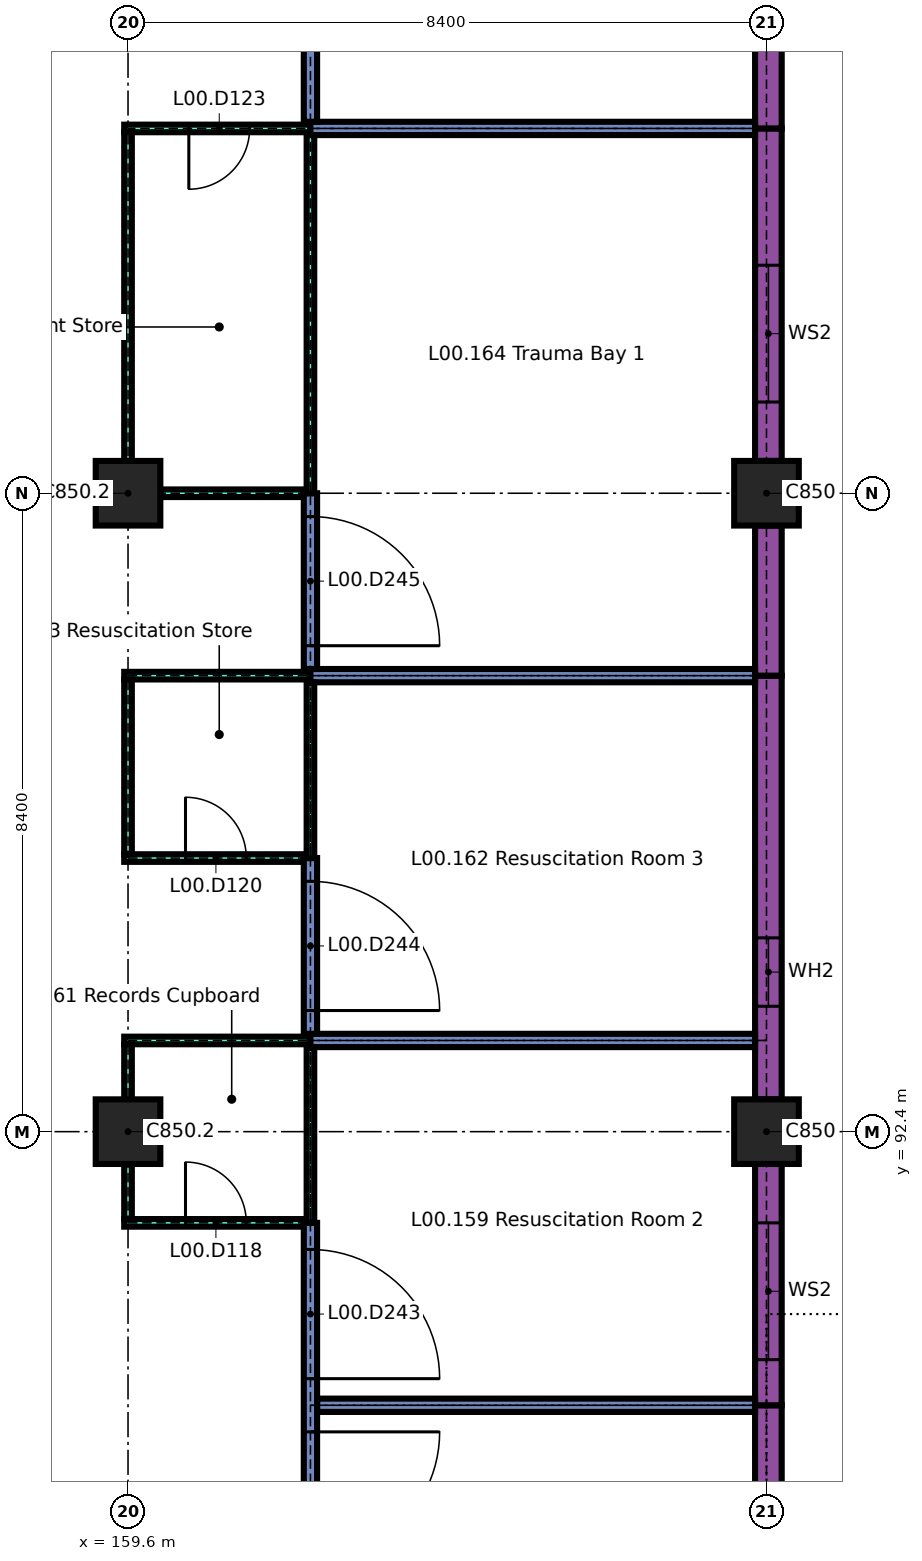
"""IFC4 building model, lengths in metres.
Left out: names, types, materials, properties, quantities, classifications, styles, units other than length and angle.
Written with IfcOpenShell. Run it as: python <this file> out.ifc"""

import sys

from ifc_helpers import new_model, si_unit, direction, frame, frame_2d, origin, origin_2d, place, context, subcontext, project, spatial, rectangle, extrude, element, fill, save


model = new_model("IFC4")
c1 = context("Model", 3, precision=1e-05, world=origin(), true_north=direction((0.0, 1.0)))
c2 = subcontext(c1, "Body", "Model", "MODEL_VIEW")
j1 = project(units=[si_unit("LENGTHUNIT", "METRE"), si_unit("PLANEANGLEUNIT", "RADIAN")], contexts=[c1])
p1 = place(None, origin())
s1 = spatial("IfcSite", under=j1, at=p1, CompositionType="ELEMENT")
p2 = place(p1, origin())
s2 = spatial("IfcBuilding", under=s1, at=p2, CompositionType="ELEMENT")
p3 = place(p2, origin())
s3 = spatial("IfcBuildingStorey", under=s2, at=p3, CompositionType="ELEMENT", Elevation=0.0)
for number, where, z_axis, x_axis in (
    (1, (159.6, 92.4, 0.0), (0.0, 0.0, 1.0), (1.0, 0.0, 0.0)),
    (2, (168.0, 92.4, 0.0), (0.0, 0.0, 1.0), (1.0, 0.0, 0.0)),
    (3, (159.6, 100.8, 0.0), (0.0, 0.0, 1.0), (1.0, 0.0, 0.0)),
    (4, (168.0, 100.8, 0.0), (0.0, 0.0, 1.0), (1.0, 0.0, 0.0)),
):
    element("IfcColumn", number, at=place(p3, frame(where, z_axis=z_axis, x_axis=x_axis)), inside=s3, PredefinedType="COLUMN", context=c2, shape_type="SweptSolid", body=[
        extrude(rectangle(XDim=0.85, YDim=0.85, at=origin_2d()), origin(), (0.0, 0.0, 1.0), 4.14),
    ])
p4 = place(p3, frame((168.025, 84.0, 0.0), z_axis=(0.0, 0.0, 1.0), x_axis=(0.0, 1.0, 0.0)))
e5 = element("IfcWall", 5, at=p4, inside=s3, PredefinedType="SOLIDWALL", context=c2, shape_type="SweptSolid", body=[
    extrude(rectangle(XDim=4.8, YDim=0.35, at=frame_2d((2.4, 0.0))), origin(), (0.0, 0.0, 1.0), 3.84),
])
p5 = place(p4, frame((1.2, 0.0, 0.9)))
e6 = element("IfcOpeningElement", 6, at=p5, cuts=e5, PredefinedType="OPENING", context=c2, shape_type="SweptSolid", body=[
    extrude(rectangle(XDim=1.8, YDim=2.1, at=frame_2d((0.9, 1.05))), frame((0.0, 0.185, 0.0), z_axis=(0.0, -1.0, 0.0), x_axis=(1.0, 0.0, 0.0)), (0.0, 0.0, 1.0), 0.37),
])
p6 = place(p3, frame((168.025, 88.8, 0.0), z_axis=(0.0, 0.0, 1.0), x_axis=(0.0, 1.0, 0.0)))
e7 = element("IfcWall", 7, at=p6, inside=s3, PredefinedType="SOLIDWALL", context=c2, shape_type="SweptSolid", body=[
    extrude(rectangle(XDim=3.175, YDim=0.35, at=frame_2d((1.587, 0.0))), origin(), (0.0, 0.0, 1.0), 3.84),
])
p7 = place(p6, frame((0.6, 0.0, 0.9)))
e8 = element("IfcOpeningElement", 8, at=p7, cuts=e7, PredefinedType="OPENING", context=c2, shape_type="SweptSolid", body=[
    extrude(rectangle(XDim=1.8, YDim=2.1, at=frame_2d((0.9, 1.05))), frame((0.0, 0.185, 0.0), z_axis=(0.0, -1.0, 0.0), x_axis=(1.0, 0.0, 0.0)), (0.0, 0.0, 1.0), 0.37),
])
p8 = place(p3, frame((168.025, 92.825, 0.0), z_axis=(0.0, 0.0, 1.0), x_axis=(0.0, 1.0, 0.0)))
e9 = element("IfcWall", 9, at=p8, inside=s3, PredefinedType="SOLIDWALL", context=c2, shape_type="SweptSolid", body=[
    extrude(rectangle(XDim=5.575, YDim=0.35, at=frame_2d((2.788, 0.0))), origin(), (0.0, 0.0, 1.0), 3.84),
])
p9 = place(p8, frame((1.225, 0.0, 0.9)))
e10 = element("IfcOpeningElement", 10, at=p9, cuts=e9, PredefinedType="OPENING", context=c2, shape_type="SweptSolid", body=[
    extrude(rectangle(XDim=0.9, YDim=2.1, at=frame_2d((0.45, 1.05))), frame((0.0, 0.185, 0.0), z_axis=(0.0, -1.0, 0.0), x_axis=(1.0, 0.0, 0.0)), (0.0, 0.0, 1.0), 0.37),
])
p10 = place(p3, frame((168.025, 98.4, 0.0), z_axis=(0.0, 0.0, 1.0), x_axis=(0.0, 1.0, 0.0)))
e11 = element("IfcWall", 11, at=p10, inside=s3, PredefinedType="SOLIDWALL", context=c2, shape_type="SweptSolid", body=[
    extrude(rectangle(XDim=1.975, YDim=0.35, at=frame_2d((0.988, 0.0))), origin(), (0.0, 0.0, 1.0), 3.84),
])
p11 = place(p3, frame((168.025, 101.225, 0.0), z_axis=(0.0, 0.0, 1.0), x_axis=(0.0, 1.0, 0.0)))
e12 = element("IfcWall", 12, at=p11, inside=s3, PredefinedType="SOLIDWALL", context=c2, shape_type="SweptSolid", body=[
    extrude(rectangle(XDim=4.375, YDim=0.35, at=frame_2d((2.188, 0.0))), origin(), (0.0, 0.0, 1.0), 3.84),
])
p12 = place(p11, frame((0.775, 0.0, 0.9)))
e13 = element("IfcOpeningElement", 13, at=p12, cuts=e12, PredefinedType="OPENING", context=c2, shape_type="SweptSolid", body=[
    extrude(rectangle(XDim=1.8, YDim=2.1, at=frame_2d((0.9, 1.05))), frame((0.0, 0.185, 0.0), z_axis=(0.0, -1.0, 0.0), x_axis=(1.0, 0.0, 0.0)), (0.0, 0.0, 1.0), 0.37),
])
p13 = place(p3, frame((168.025, 105.6, 0.0), z_axis=(0.0, 0.0, 1.0), x_axis=(0.0, 1.0, 0.0)))
e14 = element("IfcWall", 14, at=p13, inside=s3, PredefinedType="SOLIDWALL", context=c2, shape_type="SweptSolid", body=[
    extrude(rectangle(XDim=3.6, YDim=0.35, at=frame_2d((1.8, 0.0))), origin(), (0.0, 0.0, 1.0), 3.84),
])
p14 = place(p3, frame((162.087, 88.8, 0.0), z_axis=(0.0, 0.0, 1.0), x_axis=(1.0, 0.0, 0.0)))
e15 = element("IfcWall", 15, at=p14, inside=s3, PredefinedType="PARTITIONING", context=c2, shape_type="SweptSolid", body=[
    extrude(rectangle(XDim=5.763, YDim=0.175, at=frame_2d((2.881, 0.0))), origin(), (0.0, 0.0, 1.0), 4.14),
])
p15 = place(p3, frame((159.55, 91.2, 0.0), z_axis=(0.0, 0.0, 1.0), x_axis=(1.0, 0.0, 0.0)))
e16 = element("IfcWall", 16, at=p15, inside=s3, PredefinedType="PARTITIONING", context=c2, shape_type="SweptSolid", body=[
    extrude(rectangle(XDim=2.363, YDim=0.1, at=frame_2d((1.181, 0.0))), origin(), (0.0, 0.0, 1.0), 4.14),
])
p16 = place(p15, frame((0.806, 0.0, 0.0)))
e17 = element("IfcOpeningElement", 17, at=p16, cuts=e16, PredefinedType="OPENING", context=c2, shape_type="SweptSolid", body=[
    extrude(rectangle(XDim=0.8, YDim=2.1, at=frame_2d((0.4, 1.05))), frame((0.0, 0.06, 0.0), z_axis=(0.0, -1.0, 0.0), x_axis=(1.0, 0.0, 0.0)), (0.0, 0.0, 1.0), 0.12),
])
p17 = place(p3, frame((159.55, 93.6, 0.0), z_axis=(0.0, 0.0, 1.0), x_axis=(1.0, 0.0, 0.0)))
e18 = element("IfcWall", 18, at=p17, inside=s3, PredefinedType="PARTITIONING", context=c2, shape_type="SweptSolid", body=[
    extrude(rectangle(XDim=2.45, YDim=0.1, at=frame_2d((1.225, 0.0))), origin(), (0.0, 0.0, 1.0), 4.14),
])
p18 = place(p3, frame((162.0, 93.6, 0.0), z_axis=(0.0, 0.0, 1.0), x_axis=(1.0, 0.0, 0.0)))
e19 = element("IfcWall", 19, at=p18, inside=s3, PredefinedType="PARTITIONING", context=c2, shape_type="SweptSolid", body=[
    extrude(rectangle(XDim=5.85, YDim=0.175, at=frame_2d((2.925, 0.0))), origin(), (0.0, 0.0, 1.0), 4.14),
])
p19 = place(p3, frame((159.55, 96.0, 0.0), z_axis=(0.0, 0.0, 1.0), x_axis=(1.0, 0.0, 0.0)))
e20 = element("IfcWall", 20, at=p19, inside=s3, PredefinedType="PARTITIONING", context=c2, shape_type="SweptSolid", body=[
    extrude(rectangle(XDim=2.363, YDim=0.1, at=frame_2d((1.181, 0.0))), origin(), (0.0, 0.0, 1.0), 4.14),
])
p20 = place(p19, frame((0.806, 0.0, 0.0)))
e21 = element("IfcOpeningElement", 21, at=p20, cuts=e20, PredefinedType="OPENING", context=c2, shape_type="SweptSolid", body=[
    extrude(rectangle(XDim=0.8, YDim=2.1, at=frame_2d((0.4, 1.05))), frame((0.0, 0.06, 0.0), z_axis=(0.0, -1.0, 0.0), x_axis=(1.0, 0.0, 0.0)), (0.0, 0.0, 1.0), 0.12),
])
p21 = place(p3, frame((159.55, 98.4, 0.0), z_axis=(0.0, 0.0, 1.0), x_axis=(1.0, 0.0, 0.0)))
e22 = element("IfcWall", 22, at=p21, inside=s3, PredefinedType="PARTITIONING", context=c2, shape_type="SweptSolid", body=[
    extrude(rectangle(XDim=2.45, YDim=0.1, at=frame_2d((1.225, 0.0))), origin(), (0.0, 0.0, 1.0), 4.14),
])
p22 = place(p3, frame((162.0, 98.4, 0.0), z_axis=(0.0, 0.0, 1.0), x_axis=(1.0, 0.0, 0.0)))
e23 = element("IfcWall", 23, at=p22, inside=s3, PredefinedType="PARTITIONING", context=c2, shape_type="SweptSolid", body=[
    extrude(rectangle(XDim=5.85, YDim=0.175, at=frame_2d((2.925, 0.0))), origin(), (0.0, 0.0, 1.0), 4.14),
])
p23 = place(p3, frame((160.025, 100.8, 0.0), z_axis=(0.0, 0.0, 1.0), x_axis=(1.0, 0.0, 0.0)))
e24 = element("IfcWall", 24, at=p23, inside=s3, PredefinedType="PARTITIONING", context=c2, shape_type="SweptSolid", body=[
    extrude(rectangle(XDim=1.888, YDim=0.1, at=frame_2d((0.944, 0.0))), origin(), (0.0, 0.0, 1.0), 4.14),
])
p24 = place(p3, frame((159.55, 105.6, 0.0), z_axis=(0.0, 0.0, 1.0), x_axis=(1.0, 0.0, 0.0)))
e25 = element("IfcWall", 25, at=p24, inside=s3, PredefinedType="PARTITIONING", context=c2, shape_type="SweptSolid", body=[
    extrude(rectangle(XDim=2.45, YDim=0.1, at=frame_2d((1.225, 0.0))), origin(), (0.0, 0.0, 1.0), 4.14),
])
p25 = place(p24, frame((0.85, 0.0, 0.0)))
e26 = element("IfcOpeningElement", 26, at=p25, cuts=e25, PredefinedType="OPENING", context=c2, shape_type="SweptSolid", body=[
    extrude(rectangle(XDim=0.8, YDim=2.1, at=frame_2d((0.4, 1.05))), frame((0.0, 0.06, 0.0), z_axis=(0.0, -1.0, 0.0), x_axis=(1.0, 0.0, 0.0)), (0.0, 0.0, 1.0), 0.12),
])
p26 = place(p3, frame((162.0, 105.6, 0.0), z_axis=(0.0, 0.0, 1.0), x_axis=(1.0, 0.0, 0.0)))
e27 = element("IfcWall", 27, at=p26, inside=s3, PredefinedType="PARTITIONING", context=c2, shape_type="SweptSolid", body=[
    extrude(rectangle(XDim=5.85, YDim=0.175, at=frame_2d((2.925, 0.0))), origin(), (0.0, 0.0, 1.0), 4.14),
])
for number, where, z_axis, x_axis in (
    (28, (159.6, 91.25, 0.0), (0.0, 0.0, 1.0), (0.0, 1.0, 0.0)),
    (29, (159.6, 92.825, 0.0), (0.0, 0.0, 1.0), (0.0, 1.0, 0.0)),
):
    element("IfcWall", number, at=place(p3, frame(where, z_axis=z_axis, x_axis=x_axis)), inside=s3, PredefinedType="PARTITIONING", context=c2, shape_type="SweptSolid", body=[
        extrude(rectangle(XDim=0.725, YDim=0.1, at=frame_2d((0.363, 0.0))), origin(), (0.0, 0.0, 1.0), 4.14),
    ])
p27 = place(p3, frame((159.6, 96.05, 0.0), z_axis=(0.0, 0.0, 1.0), x_axis=(0.0, 1.0, 0.0)))
e30 = element("IfcWall", 30, at=p27, inside=s3, PredefinedType="PARTITIONING", context=c2, shape_type="SweptSolid", body=[
    extrude(rectangle(XDim=2.3, YDim=0.1, at=frame_2d((1.15, 0.0))), origin(), (0.0, 0.0, 1.0), 4.14),
])
p28 = place(p3, frame((159.6, 101.225, 0.0), z_axis=(0.0, 0.0, 1.0), x_axis=(0.0, 1.0, 0.0)))
e31 = element("IfcWall", 31, at=p28, inside=s3, PredefinedType="PARTITIONING", context=c2, shape_type="SweptSolid", body=[
    extrude(rectangle(XDim=4.325, YDim=0.1, at=frame_2d((2.163, 0.0))), origin(), (0.0, 0.0, 1.0), 4.14),
])
p29 = place(p3, frame((162.0, 86.4, 0.0), z_axis=(0.0, 0.0, 1.0), x_axis=(0.0, 1.0, 0.0)))
e32 = element("IfcWall", 32, at=p29, inside=s3, PredefinedType="PARTITIONING", context=c2, shape_type="SweptSolid", body=[
    extrude(rectangle(XDim=4.8, YDim=0.175, at=frame_2d((2.4, 0.0))), origin(), (0.0, 0.0, 1.0), 4.14),
])
p30 = place(p29, frame((0.35, 0.0, 0.0)))
e33 = element("IfcOpeningElement", 33, at=p30, cuts=e32, PredefinedType="OPENING", context=c2, shape_type="SweptSolid", body=[
    extrude(rectangle(XDim=1.7, YDim=2.4, at=frame_2d((0.85, 1.2))), frame((0.0, 0.097, 0.0), z_axis=(0.0, -1.0, 0.0), x_axis=(1.0, 0.0, 0.0)), (0.0, 0.0, 1.0), 0.195),
])
p31 = place(p29, frame((2.75, 0.0, 0.0)))
e34 = element("IfcOpeningElement", 34, at=p31, cuts=e32, PredefinedType="OPENING", context=c2, shape_type="SweptSolid", body=[
    extrude(rectangle(XDim=1.7, YDim=2.4, at=frame_2d((0.85, 1.2))), frame((0.0, 0.097, 0.0), z_axis=(0.0, -1.0, 0.0), x_axis=(1.0, 0.0, 0.0)), (0.0, 0.0, 1.0), 0.195),
])
p32 = place(p3, frame((162.0, 91.2, 0.0), z_axis=(0.0, 0.0, 1.0), x_axis=(0.0, 1.0, 0.0)))
e35 = element("IfcWall", 35, at=p32, inside=s3, PredefinedType="PARTITIONING", context=c2, shape_type="SweptSolid", body=[
    extrude(rectangle(XDim=2.312, YDim=0.1, at=frame_2d((1.156, 0.0))), origin(), (0.0, 0.0, 1.0), 4.14),
])
p33 = place(p3, frame((162.0, 93.688, 0.0), z_axis=(0.0, 0.0, 1.0), x_axis=(0.0, 1.0, 0.0)))
e36 = element("IfcWall", 36, at=p33, inside=s3, PredefinedType="PARTITIONING", context=c2, shape_type="SweptSolid", body=[
    extrude(rectangle(XDim=2.312, YDim=0.175, at=frame_2d((1.156, 0.0))), origin(), (0.0, 0.0, 1.0), 4.14),
])
p34 = place(p33, frame((0.306, 0.0, 0.0)))
e37 = element("IfcOpeningElement", 37, at=p34, cuts=e36, PredefinedType="OPENING", context=c2, shape_type="SweptSolid", body=[
    extrude(rectangle(XDim=1.7, YDim=2.4, at=frame_2d((0.85, 1.2))), frame((0.0, 0.097, 0.0), z_axis=(0.0, -1.0, 0.0), x_axis=(1.0, 0.0, 0.0)), (0.0, 0.0, 1.0), 0.195),
])
p35 = place(p3, frame((162.0, 96.0, 0.0), z_axis=(0.0, 0.0, 1.0), x_axis=(0.0, 1.0, 0.0)))
e38 = element("IfcWall", 38, at=p35, inside=s3, PredefinedType="PARTITIONING", context=c2, shape_type="SweptSolid", body=[
    extrude(rectangle(XDim=2.312, YDim=0.1, at=frame_2d((1.156, 0.0))), origin(), (0.0, 0.0, 1.0), 4.14),
])
p36 = place(p3, frame((162.0, 98.488, 0.0), z_axis=(0.0, 0.0, 1.0), x_axis=(0.0, 1.0, 0.0)))
e39 = element("IfcWall", 39, at=p36, inside=s3, PredefinedType="PARTITIONING", context=c2, shape_type="SweptSolid", body=[
    extrude(rectangle(XDim=2.312, YDim=0.175, at=frame_2d((1.156, 0.0))), origin(), (0.0, 0.0, 1.0), 4.14),
])
p37 = place(p36, frame((0.306, 0.0, 0.0)))
e40 = element("IfcOpeningElement", 40, at=p37, cuts=e39, PredefinedType="OPENING", context=c2, shape_type="SweptSolid", body=[
    extrude(rectangle(XDim=1.7, YDim=2.4, at=frame_2d((0.85, 1.2))), frame((0.0, 0.097, 0.0), z_axis=(0.0, -1.0, 0.0), x_axis=(1.0, 0.0, 0.0)), (0.0, 0.0, 1.0), 0.195),
])
p38 = place(p3, frame((162.0, 100.8, 0.0), z_axis=(0.0, 0.0, 1.0), x_axis=(0.0, 1.0, 0.0)))
e41 = element("IfcWall", 41, at=p38, inside=s3, PredefinedType="PARTITIONING", context=c2, shape_type="SweptSolid", body=[
    extrude(rectangle(XDim=4.712, YDim=0.1, at=frame_2d((2.356, 0.0))), origin(), (0.0, 0.0, 1.0), 4.14),
])
p39 = place(p3, frame((162.0, 105.688, 0.0), z_axis=(0.0, 0.0, 1.0), x_axis=(0.0, 1.0, 0.0)))
e42 = element("IfcWall", 42, at=p39, inside=s3, PredefinedType="PARTITIONING", context=c2, shape_type="SweptSolid", body=[
    extrude(rectangle(XDim=3.413, YDim=0.175, at=frame_2d((1.706, 0.0))), origin(), (0.0, 0.0, 1.0), 4.14),
])
p40 = place(p39, frame((1.006, 0.0, 0.0)))
e43 = element("IfcOpeningElement", 43, at=p40, cuts=e42, PredefinedType="OPENING", context=c2, shape_type="SweptSolid", body=[
    extrude(rectangle(XDim=1.4, YDim=2.1, at=frame_2d((0.7, 1.05))), frame((0.0, 0.097, 0.0), z_axis=(0.0, -1.0, 0.0), x_axis=(1.0, 0.0, 0.0)), (0.0, 0.0, 1.0), 0.195),
])
p41 = place(p7, origin())
e44 = element("IfcWindow", 44, at=p41, inside=s3, PartitioningType="SINGLE_PANEL", PredefinedType="WINDOW", context=c2, shape_type="SweptSolid", body=[
    extrude(rectangle(XDim=1.8, YDim=2.1, at=frame_2d((0.9, 1.05))), frame((0.0, 0.045, 0.0), z_axis=(0.0, -1.0, 0.0), x_axis=(1.0, 0.0, 0.0)), (0.0, 0.0, 1.0), 0.09),
])
fill(e8, e44)
p42 = place(p9, origin())
e45 = element("IfcWindow", 45, at=p42, inside=s3, PartitioningType="SINGLE_PANEL", PredefinedType="WINDOW", context=c2, shape_type="SweptSolid", body=[
    extrude(rectangle(XDim=0.9, YDim=2.1, at=frame_2d((0.45, 1.05))), frame((0.0, 0.03, 0.0), z_axis=(0.0, -1.0, 0.0), x_axis=(1.0, 0.0, 0.0)), (0.0, 0.0, 1.0), 0.06),
])
fill(e10, e45)
p43 = place(p12, origin())
e46 = element("IfcWindow", 46, at=p43, inside=s3, PartitioningType="SINGLE_PANEL", PredefinedType="WINDOW", context=c2, shape_type="SweptSolid", body=[
    extrude(rectangle(XDim=1.8, YDim=2.1, at=frame_2d((0.9, 1.05))), frame((0.0, 0.045, 0.0), z_axis=(0.0, -1.0, 0.0), x_axis=(1.0, 0.0, 0.0)), (0.0, 0.0, 1.0), 0.09),
])
fill(e13, e46)
p44 = place(p16, origin())
e47 = element("IfcDoor", 47, at=p44, inside=s3, OperationType="SINGLE_SWING_RIGHT", PredefinedType="DOOR", context=c2, shape_type="SweptSolid", body=[
    extrude(rectangle(XDim=0.8, YDim=2.1, at=frame_2d((0.4, 1.05))), frame((0.0, 0.02, 0.0), z_axis=(0.0, -1.0, 0.0), x_axis=(1.0, 0.0, 0.0)), (0.0, 0.0, 1.0), 0.04),
])
fill(e17, e47)
p45 = place(p20, origin())
e48 = element("IfcDoor", 48, at=p45, inside=s3, OperationType="SINGLE_SWING_RIGHT", PredefinedType="DOOR", context=c2, shape_type="SweptSolid", body=[
    extrude(rectangle(XDim=0.8, YDim=2.1, at=frame_2d((0.4, 1.05))), frame((0.0, 0.02, 0.0), z_axis=(0.0, -1.0, 0.0), x_axis=(1.0, 0.0, 0.0)), (0.0, 0.0, 1.0), 0.04),
])
fill(e21, e48)
p46 = place(p25, origin())
e49 = element("IfcDoor", 49, at=p46, inside=s3, OperationType="SINGLE_SWING_LEFT", PredefinedType="DOOR", context=c2, shape_type="SweptSolid", body=[
    extrude(rectangle(XDim=0.8, YDim=2.1, at=frame_2d((0.4, 1.05))), frame((0.0, 0.02, 0.0), z_axis=(0.0, -1.0, 0.0), x_axis=(1.0, 0.0, 0.0)), (0.0, 0.0, 1.0), 0.04),
])
fill(e26, e49)
p47 = place(p30, origin())
e50 = element("IfcDoor", 50, at=p47, inside=s3, OperationType="SINGLE_SWING_RIGHT", PredefinedType="DOOR", context=c2, shape_type="SweptSolid", body=[
    extrude(rectangle(XDim=1.7, YDim=2.4, at=frame_2d((0.85, 1.2))), frame((0.0, 0.025, 0.0), z_axis=(0.0, -1.0, 0.0), x_axis=(1.0, 0.0, 0.0)), (0.0, 0.0, 1.0), 0.05),
])
fill(e33, e50)
p48 = place(p31, origin())
e51 = element("IfcDoor", 51, at=p48, inside=s3, OperationType="SINGLE_SWING_LEFT", PredefinedType="DOOR", context=c2, shape_type="SweptSolid", body=[
    extrude(rectangle(XDim=1.7, YDim=2.4, at=frame_2d((0.85, 1.2))), frame((0.0, 0.025, 0.0), z_axis=(0.0, -1.0, 0.0), x_axis=(1.0, 0.0, 0.0)), (0.0, 0.0, 1.0), 0.05),
])
fill(e34, e51)
p49 = place(p34, origin())
e52 = element("IfcDoor", 52, at=p49, inside=s3, OperationType="SINGLE_SWING_LEFT", PredefinedType="DOOR", context=c2, shape_type="SweptSolid", body=[
    extrude(rectangle(XDim=1.7, YDim=2.4, at=frame_2d((0.85, 1.2))), frame((0.0, 0.025, 0.0), z_axis=(0.0, -1.0, 0.0), x_axis=(1.0, 0.0, 0.0)), (0.0, 0.0, 1.0), 0.05),
])
fill(e37, e52)
p50 = place(p37, origin())
e53 = element("IfcDoor", 53, at=p50, inside=s3, OperationType="SINGLE_SWING_LEFT", PredefinedType="DOOR", context=c2, shape_type="SweptSolid", body=[
    extrude(rectangle(XDim=1.7, YDim=2.4, at=frame_2d((0.85, 1.2))), frame((0.0, 0.025, 0.0), z_axis=(0.0, -1.0, 0.0), x_axis=(1.0, 0.0, 0.0)), (0.0, 0.0, 1.0), 0.05),
])
fill(e40, e53)
save(model, sys.argv[1])
